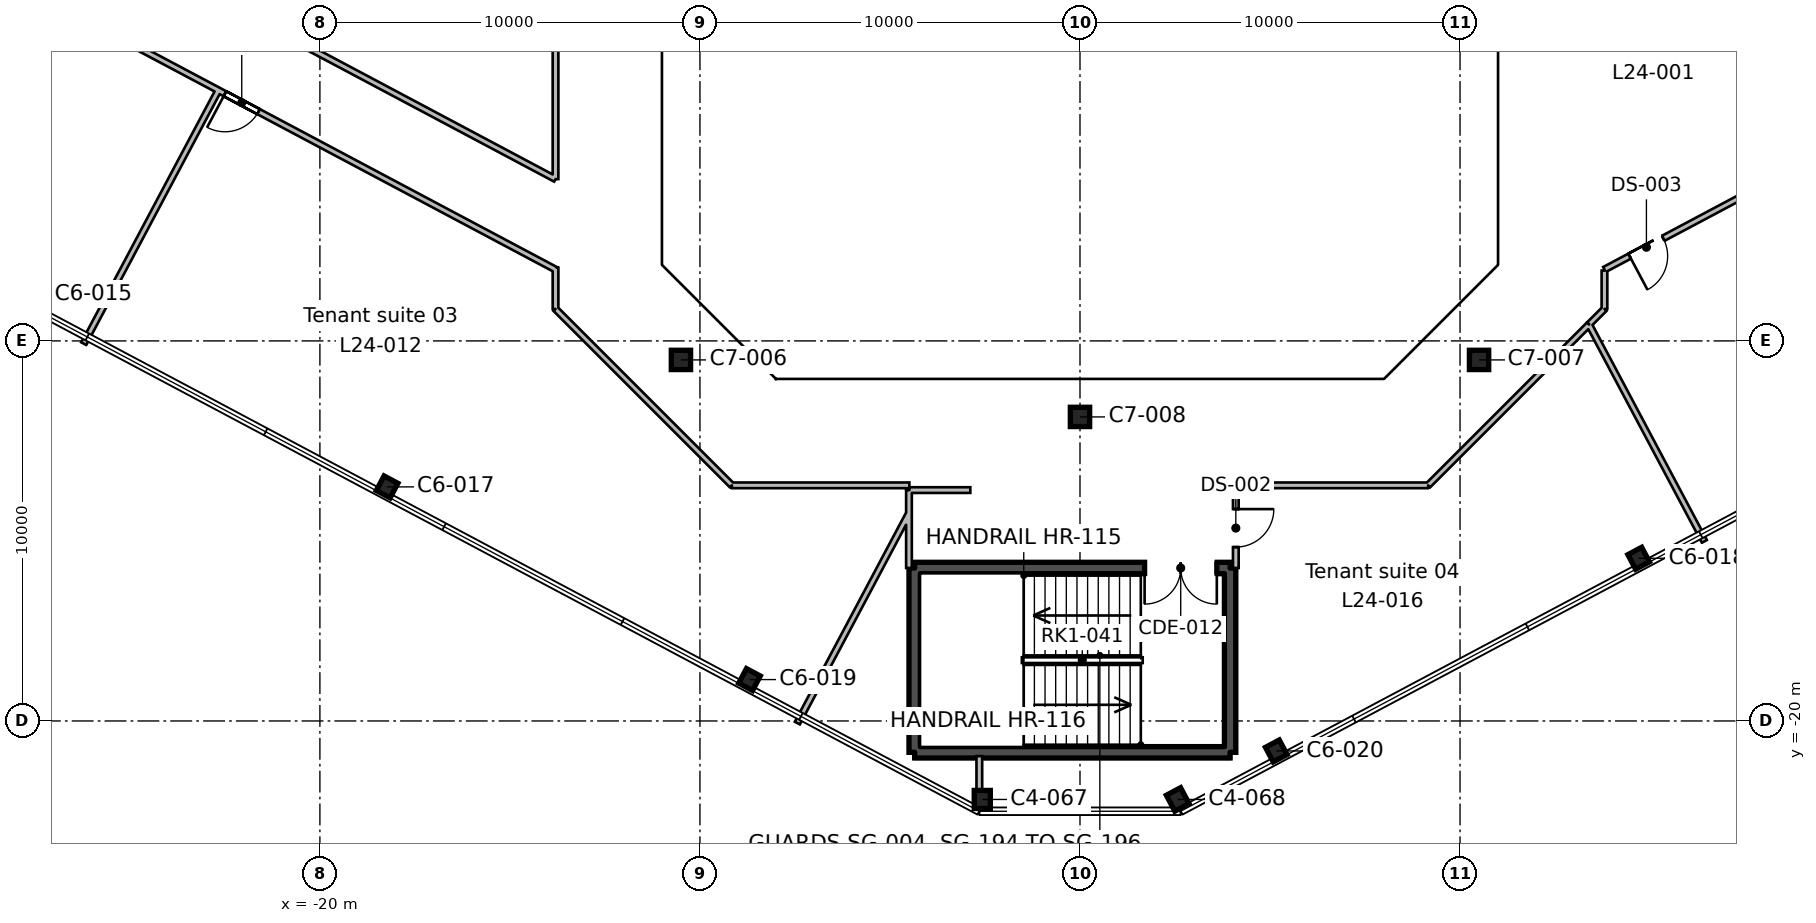
"""IFC4 building model, lengths in metres.
Left out: names, types, materials, properties, quantities, classifications, styles, units other than length and angle.
Written with IfcOpenShell. Run it as: python <this file> out.ifc"""

import sys

from ifc_helpers import new_model, si_unit, direction, frame, frame_2d, origin, origin_2d, place, context, subcontext, project, spatial, rectangle, hollow_rectangle, i_section, extrude, element, fill, save


model = new_model("IFC4")
c1 = context("Model", 3, precision=1e-05, world=origin(), true_north=direction((0.0, 1.0)))
c2 = subcontext(c1, "Body", "Model", "MODEL_VIEW")
j1 = project(units=[si_unit("LENGTHUNIT", "METRE"), si_unit("PLANEANGLEUNIT", "RADIAN")], contexts=[c1])
p1 = place(None, origin())
s1 = spatial("IfcSite", under=j1, at=p1, CompositionType="ELEMENT")
p2 = place(p1, origin())
s2 = spatial("IfcBuilding", under=s1, at=p2, CompositionType="ELEMENT")
p3 = place(p2, frame((0.0, 0.0, 122.2)))
s3 = spatial("IfcBuildingStorey", under=s2, at=p3, CompositionType="ELEMENT", Elevation=122.2)
for number, where, z_axis, x_axis in (
    (1, (-2.571, -22.065, 0.0), (0.0, 0.0, 1.0), (1.0, 0.0, 0.0)),
    (2, (2.571, -22.065, 0.0), (0.0, 0.0, 1.0), (0.883, 0.469, 0.0)),
):
    element("IfcColumn", number, at=place(p3, frame(where, z_axis=z_axis, x_axis=x_axis)), inside=s3, PredefinedType="COLUMN", context=c2, shape_type="SweptSolid", body=[
        extrude(i_section(OverallWidth=0.424, OverallDepth=0.475, WebThickness=0.048, FlangeThickness=0.077, FilletRadius=0.015, at=origin_2d()), origin(), (0.0, 0.0, 1.0), 4.0),
    ])
for number, where, z_axis, x_axis in (
    (3, (5.164, -20.789, 0.0), (0.0, 0.0, 1.0), (0.883, 0.469, 0.0)),
    (4, (-8.696, -18.911, 0.0), (0.0, 0.0, 1.0), (0.883, -0.469, 0.0)),
    (5, (14.7, -15.719, 0.0), (0.0, 0.0, 1.0), (0.883, 0.469, 0.0)),
    (6, (-18.232, -13.841, 0.0), (0.0, 0.0, 1.0), (0.883, -0.469, 0.0)),
):
    element("IfcColumn", number, at=place(p3, frame(where, z_axis=z_axis, x_axis=x_axis)), inside=s3, PredefinedType="COLUMN", context=c2, shape_type="SweptSolid", body=[
        extrude(i_section(OverallWidth=0.412, OverallDepth=0.434, WebThickness=0.036, FlangeThickness=0.057, FilletRadius=0.015, at=origin_2d()), origin(), (0.0, 0.0, 1.0), 4.0),
    ])
for number, where, z_axis, x_axis in (
    (7, (0.0, -12.0, 0.0), (0.0, 0.0, 1.0), (1.0, 0.0, 0.0)),
    (8, (-10.5, -10.5, 0.0), (0.0, 0.0, 1.0), (1.0, 0.0, 0.0)),
    (9, (10.5, -10.5, 0.0), (0.0, 0.0, 1.0), (1.0, 0.0, 0.0)),
):
    element("IfcColumn", number, at=place(p3, frame(where, z_axis=z_axis, x_axis=x_axis)), inside=s3, PredefinedType="COLUMN", context=c2, shape_type="SweptSolid", body=[
        extrude(hollow_rectangle(XDim=0.508, YDim=0.508, WallThickness=0.012, InnerFilletRadius=0.006, OuterFilletRadius=0.018, at=origin_2d()), origin(), (0.0, 0.0, 1.0), 4.0),
    ])
p4 = place(p3, frame((3.95, -15.975, 0.0), z_axis=(0.0, 0.0, 1.0), x_axis=(0.0, -1.0, 0.0)))
e10 = element("IfcWall", 10, at=p4, inside=s3, PredefinedType="SHEAR", context=c2, shape_type="SweptSolid", body=[
    extrude(rectangle(XDim=4.85, YDim=0.3, at=frame_2d((2.425, 0.0))), origin(), (0.0, 0.0, 1.0), 4.0),
])
p5 = place(p3, frame((3.95, -20.825, 0.0), z_axis=(0.0, 0.0, 1.0), x_axis=(-1.0, 0.0, 0.0)))
e11 = element("IfcWall", 11, at=p5, inside=s3, PredefinedType="SHEAR", context=c2, shape_type="SweptSolid", body=[
    extrude(rectangle(XDim=8.3, YDim=0.3, at=frame_2d((4.15, 0.0))), origin(), (0.0, 0.0, 1.0), 4.0),
])
p6 = place(p3, frame((-4.35, -20.825, 0.0), z_axis=(0.0, 0.0, 1.0), x_axis=(0.0, 1.0, 0.0)))
e12 = element("IfcWall", 12, at=p6, inside=s3, PredefinedType="SHEAR", context=c2, shape_type="SweptSolid", body=[
    extrude(rectangle(XDim=4.85, YDim=0.3, at=frame_2d((2.425, 0.0))), origin(), (0.0, 0.0, 1.0), 4.0),
])
p7 = place(p3, frame((-4.35, -15.975, 0.0), z_axis=(0.0, 0.0, 1.0), x_axis=(1.0, 0.0, 0.0)))
e13 = element("IfcWall", 13, at=p7, inside=s3, PredefinedType="SHEAR", context=c2, shape_type="SweptSolid", body=[
    extrude(rectangle(XDim=8.3, YDim=0.3, at=frame_2d((4.15, 0.0))), origin(), (0.0, 0.0, 1.0), 4.0),
])
p8 = place(p7, frame((6.05, 0.0, 0.0)))
e14 = element("IfcOpeningElement", 14, at=p8, cuts=e13, PredefinedType="OPENING", context=c2, shape_type="SweptSolid", body=[
    extrude(rectangle(XDim=1.9, YDim=2.1, at=frame_2d((0.95, 1.05))), frame((0.0, 0.16, 0.0), z_axis=(0.0, -1.0, 0.0), x_axis=(1.0, 0.0, 0.0)), (0.0, 0.0, 1.0), 0.32),
])
p9 = place(p3, frame((-13.8, -8.122, 0.0), z_axis=(0.0, 0.0, 1.0), x_axis=(-0.882950271686, 0.469466524611, 0.0)))
e15 = element("IfcWall", 15, at=p9, inside=s3, PredefinedType="PARTITIONING", context=c2, shape_type="SweptSolid", body=[
    extrude(rectangle(XDim=34.727, YDim=0.15, at=frame_2d((17.363, 0.0))), origin(), (0.0, 0.0, 1.0), 3.64),
])
p10 = place(p9, frame((26.15, 0.0, 0.0)))
e16 = element("IfcOpeningElement", 16, at=p10, cuts=e15, PredefinedType="OPENING", context=c2, shape_type="SweptSolid", body=[
    extrude(rectangle(XDim=1.0, YDim=2.1, at=frame_2d((0.5, 1.05))), frame((0.0, 0.085, 0.0), z_axis=(0.0, -1.0, 0.0), x_axis=(1.0, 0.0, 0.0)), (0.0, 0.0, 1.0), 0.17),
])
p11 = place(p9, frame((16.85, 0.0, 0.0)))
e17 = element("IfcOpeningElement", 17, at=p11, cuts=e15, PredefinedType="OPENING", context=c2, shape_type="SweptSolid", body=[
    extrude(rectangle(XDim=1.0, YDim=2.1, at=frame_2d((0.5, 1.05))), frame((0.0, 0.085, 0.0), z_axis=(0.0, -1.0, 0.0), x_axis=(1.0, 0.0, 0.0)), (0.0, 0.0, 1.0), 0.17),
])
p12 = place(p9, frame((8.851, 0.0, 0.0)))
e18 = element("IfcOpeningElement", 18, at=p12, cuts=e15, PredefinedType="OPENING", context=c2, shape_type="SweptSolid", body=[
    extrude(rectangle(XDim=1.0, YDim=2.1, at=frame_2d((0.5, 1.05))), frame((0.0, 0.085, 0.0), z_axis=(0.0, -1.0, 0.0), x_axis=(1.0, 0.0, 0.0)), (0.0, 0.0, 1.0), 0.17),
])
p13 = place(p3, frame((-22.67, -3.406, 0.0), z_axis=(0.0, 0.0, 1.0), x_axis=(-0.469451537303, -0.882958240306, 0.0)))
e19 = element("IfcWall", 19, at=p13, inside=s3, PredefinedType="PARTITIONING", context=c2, shape_type="SweptSolid", body=[
    extrude(rectangle(XDim=7.55, YDim=0.15, at=frame_2d((3.775, 0.0))), origin(), (0.0, 0.0, 1.0), 3.64),
])
p14 = place(p3, frame((-4.49, -13.8, 0.0), z_axis=(0.0, 0.0, 1.0), x_axis=(-1.0, 0.0, 0.0)))
e20 = element("IfcWall", 20, at=p14, inside=s3, PredefinedType="PARTITIONING", context=c2, shape_type="SweptSolid", body=[
    extrude(rectangle(XDim=4.67, YDim=0.15, at=frame_2d((2.335, 0.0))), origin(), (0.0, 0.0, 1.0), 3.64),
])
p15 = place(p3, frame((-9.16, -13.8, 0.0), z_axis=(0.0, 0.0, 1.0), x_axis=(-0.707106781187, 0.707106781187, 0.0)))
e21 = element("IfcWall", 21, at=p15, inside=s3, PredefinedType="PARTITIONING", context=c2, shape_type="SweptSolid", body=[
    extrude(rectangle(XDim=6.562, YDim=0.15, at=frame_2d((3.281, 0.0))), origin(), (0.0, 0.0, 1.0), 3.64),
])
p16 = place(p3, frame((-13.8, -9.16, 0.0), z_axis=(0.0, 0.0, 1.0), x_axis=(0.0, 1.0, 0.0)))
e22 = element("IfcWall", 22, at=p16, inside=s3, PredefinedType="PARTITIONING", context=c2, shape_type="SweptSolid", body=[
    extrude(rectangle(XDim=1.088, YDim=0.15, at=frame_2d((0.544, 0.0))), origin(), (0.0, 0.0, 1.0), 3.64),
])
p17 = place(p3, frame((-4.5, -14.533, 0.0), z_axis=(0.0, 0.0, 1.0), x_axis=(-0.469522352041, -0.882920585859, 0.0)))
e23 = element("IfcWall", 23, at=p17, inside=s3, PredefinedType="PARTITIONING", context=c2, shape_type="SweptSolid", body=[
    extrude(rectangle(XDim=6.255, YDim=0.15, at=frame_2d((3.128, 0.0))), origin(), (0.0, 0.0, 1.0), 3.64),
])
p18 = place(p3, frame((-4.5, -13.926, 0.0), z_axis=(0.0, 0.0, 1.0), x_axis=(0.0, -1.0, 0.0)))
e24 = element("IfcWall", 24, at=p18, inside=s3, PredefinedType="PARTITIONING", context=c2, shape_type="SweptSolid", body=[
    extrude(rectangle(XDim=2.049, YDim=0.15, at=frame_2d((1.024, 0.0))), origin(), (0.0, 0.0, 1.0), 3.64),
])
p19 = place(p3, frame((-4.49, -13.925, 0.0), z_axis=(0.0, 0.0, 1.0), x_axis=(1.0, 0.0, 0.0)))
e25 = element("IfcWall", 25, at=p19, inside=s3, PredefinedType="PARTITIONING", context=c2, shape_type="SweptSolid", body=[
    extrude(rectangle(XDim=1.604, YDim=0.15, at=frame_2d((0.802, 0.0))), origin(), (0.0, 0.0, 1.0), 3.64),
])
p20 = place(p3, frame((-2.649, -21.828, 0.0), z_axis=(0.0, 0.0, 1.0), x_axis=(0.0, 1.0, 0.0)))
e26 = element("IfcWall", 26, at=p20, inside=s3, PredefinedType="PARTITIONING", context=c2, shape_type="SweptSolid", body=[
    extrude(rectangle(XDim=0.903, YDim=0.15, at=frame_2d((0.451, 0.0))), origin(), (0.0, 0.0, 1.0), 3.64),
])
p21 = place(p3, frame((4.1, -15.975, 0.0), z_axis=(0.0, 0.0, 1.0), x_axis=(0.0, 1.0, 0.0)))
e27 = element("IfcWall", 27, at=p21, inside=s3, PredefinedType="PARTITIONING", context=c2, shape_type="SweptSolid", body=[
    extrude(rectangle(XDim=2.15, YDim=0.15, at=frame_2d((1.075, 0.0))), origin(), (0.0, 0.0, 1.0), 3.64),
])
p22 = place(p21, frame((0.55, 0.0, 0.0)))
e28 = element("IfcOpeningElement", 28, at=p22, cuts=e27, PredefinedType="OPENING", context=c2, shape_type="SweptSolid", body=[
    extrude(rectangle(XDim=1.0, YDim=2.1, at=frame_2d((0.5, 1.05))), frame((0.0, 0.085, 0.0), z_axis=(0.0, -1.0, 0.0), x_axis=(1.0, 0.0, 0.0)), (0.0, 0.0, 1.0), 0.17),
])
p23 = place(p3, frame((5.303, -13.8, 0.0), z_axis=(0.0, 0.0, 1.0), x_axis=(-1.0, 0.0, 0.0)))
e29 = element("IfcWall", 29, at=p23, inside=s3, PredefinedType="PARTITIONING", context=c2, shape_type="SweptSolid", body=[
    extrude(rectangle(XDim=1.353, YDim=0.15, at=frame_2d((0.677, 0.0))), origin(), (0.0, 0.0, 1.0), 3.64),
])
p24 = place(p3, frame((13.393, -9.567, 0.0), z_axis=(0.0, 0.0, 1.0), x_axis=(-0.707106781187, -0.707106781187, 0.0)))
e30 = element("IfcWall", 30, at=p24, inside=s3, PredefinedType="PARTITIONING", context=c2, shape_type="SweptSolid", body=[
    extrude(rectangle(XDim=5.987, YDim=0.15, at=frame_2d((2.993, 0.0))), origin(), (0.0, 0.0, 1.0), 3.64),
])
p25 = place(p3, frame((9.16, -13.8, 0.0), z_axis=(0.0, 0.0, 1.0), x_axis=(-1.0, 0.0, 0.0)))
e31 = element("IfcWall", 31, at=p25, inside=s3, PredefinedType="PARTITIONING", context=c2, shape_type="SweptSolid", body=[
    extrude(rectangle(XDim=3.857, YDim=0.15, at=frame_2d((1.928, 0.0))), origin(), (0.0, 0.0, 1.0), 3.64),
])
p26 = place(p3, frame((13.393, -9.567, 0.0), z_axis=(0.0, 0.0, 1.0), x_axis=(0.469578527863, -0.882890710207, 0.0)))
e32 = element("IfcWall", 32, at=p26, inside=s3, PredefinedType="PARTITIONING", context=c2, shape_type="SweptSolid", body=[
    extrude(rectangle(XDim=6.465, YDim=0.15, at=frame_2d((3.232, 0.0))), origin(), (0.0, 0.0, 1.0), 3.64),
])
p27 = place(p3, frame((13.8, -8.15, 0.0), z_axis=(0.0, 0.0, 1.0), x_axis=(0.0, -1.0, 0.0)))
e33 = element("IfcWall", 33, at=p27, inside=s3, PredefinedType="PARTITIONING", context=c2, shape_type="SweptSolid", body=[
    extrude(rectangle(XDim=1.01, YDim=0.15, at=frame_2d((0.505, 0.0))), origin(), (0.0, 0.0, 1.0), 3.64),
])
p28 = place(p3, frame((13.8, -9.16, 0.0), z_axis=(0.0, 0.0, 1.0), x_axis=(-0.707106781187, -0.707106781187, 0.0)))
e34 = element("IfcWall", 34, at=p28, inside=s3, PredefinedType="PARTITIONING", context=c2, shape_type="SweptSolid", body=[
    extrude(rectangle(XDim=0.57, YDim=0.15, at=frame_2d((0.285, 0.0))), origin(), (0.0, 0.0, 1.0), 3.64),
])
p29 = place(p3, frame((13.8, -8.122, 0.0), z_axis=(0.0, 0.0, 1.0), x_axis=(0.883005513351, 0.469362613969, 0.0)))
e35 = element("IfcWall", 35, at=p29, inside=s3, PredefinedType="PARTITIONING", context=c2, shape_type="SweptSolid", body=[
    extrude(rectangle(XDim=2.41, YDim=0.15, at=frame_2d((1.205, 0.0))), origin(), (0.0, 0.0, 1.0), 3.64),
])
p30 = place(p29, frame((0.75, 0.0, 0.0)))
e36 = element("IfcOpeningElement", 36, at=p30, cuts=e35, PredefinedType="OPENING", context=c2, shape_type="SweptSolid", body=[
    extrude(rectangle(XDim=1.0, YDim=2.1, at=frame_2d((0.5, 1.05))), frame((0.0, 0.085, 0.0), z_axis=(0.0, -1.0, 0.0), x_axis=(1.0, 0.0, 0.0)), (0.0, 0.0, 1.0), 0.17),
])
p31 = place(p3, frame((24.641, -2.358, 0.0), z_axis=(0.0, 0.0, 1.0), x_axis=(-0.882939162052, -0.469487418484, 0.0)))
e37 = element("IfcWall", 37, at=p31, inside=s3, PredefinedType="PARTITIONING", context=c2, shape_type="SweptSolid", body=[
    extrude(rectangle(XDim=9.868, YDim=0.15, at=frame_2d((4.934, 0.0))), origin(), (0.0, 0.0, 1.0), 3.64),
])
p32 = place(p3, frame((-13.8, 9.16, 0.0), z_axis=(0.0, 0.0, 1.0), x_axis=(0.0, -1.0, 0.0)))
e38 = element("IfcWall", 38, at=p32, inside=s3, PredefinedType="PARTITIONING", context=c2, shape_type="SweptSolid", body=[
    extrude(rectangle(XDim=14.904, YDim=0.15, at=frame_2d((7.452, 0.0))), origin(), (0.0, 0.0, 1.0), 3.64),
])
p33 = place(p3, frame((-13.8, -5.744, 0.0), z_axis=(0.0, 0.0, 1.0), x_axis=(-0.882913323819, 0.469536007803, 0.0)))
e39 = element("IfcWall", 39, at=p33, inside=s3, PredefinedType="PARTITIONING", context=c2, shape_type="SweptSolid", body=[
    extrude(rectangle(XDim=8.312, YDim=0.15, at=frame_2d((4.156, 0.0))), origin(), (0.0, 0.0, 1.0), 3.64),
])
p34 = place(p8, frame((1.9, 0.0, 0.0), z_axis=(0.0, 0.0, 1.0), x_axis=(-1.0, 0.0, 0.0)))
e40 = element("IfcDoor", 40, at=p34, inside=s3, OperationType="DOUBLE_DOOR_SINGLE_SWING", PredefinedType="DOOR", context=c2, shape_type="SweptSolid", body=[
    extrude(rectangle(XDim=1.9, YDim=2.1, at=frame_2d((0.95, 1.05))), frame((0.0, 0.025, 0.0), z_axis=(0.0, -1.0, 0.0), x_axis=(1.0, 0.0, 0.0)), (0.0, 0.0, 1.0), 0.05),
])
fill(e14, e40)
p35 = place(p22, frame((1.0, 0.0, 0.0), z_axis=(0.0, 0.0, 1.0), x_axis=(-1.0, 0.0, 0.0)))
e41 = element("IfcDoor", 41, at=p35, inside=s3, OperationType="SINGLE_SWING_LEFT", PredefinedType="DOOR", context=c2, shape_type="SweptSolid", body=[
    extrude(rectangle(XDim=1.0, YDim=2.1, at=frame_2d((0.5, 1.05))), frame((0.0, 0.025, 0.0), z_axis=(0.0, -1.0, 0.0), x_axis=(1.0, 0.0, 0.0)), (0.0, 0.0, 1.0), 0.05),
])
fill(e28, e41)
p36 = place(p30, frame((1.0, 0.0, 0.0), z_axis=(0.0, 0.0, 1.0), x_axis=(-1.0, 0.0, 0.0)))
e42 = element("IfcDoor", 42, at=p36, inside=s3, OperationType="SINGLE_SWING_RIGHT", PredefinedType="DOOR", context=c2, shape_type="SweptSolid", body=[
    extrude(rectangle(XDim=1.0, YDim=2.1, at=frame_2d((0.5, 1.05))), frame((0.0, 0.025, 0.0), z_axis=(0.0, -1.0, 0.0), x_axis=(1.0, 0.0, 0.0)), (0.0, 0.0, 1.0), 0.05),
])
fill(e36, e42)
p37 = place(p12, origin())
e43 = element("IfcDoor", 43, at=p37, inside=s3, OperationType="SINGLE_SWING_RIGHT", PredefinedType="DOOR", context=c2, shape_type="SweptSolid", body=[
    extrude(rectangle(XDim=1.0, YDim=2.1, at=frame_2d((0.5, 1.05))), frame((0.0, 0.025, 0.0), z_axis=(0.0, -1.0, 0.0), x_axis=(1.0, 0.0, 0.0)), (0.0, 0.0, 1.0), 0.05),
])
fill(e18, e43)
save(model, sys.argv[1])
